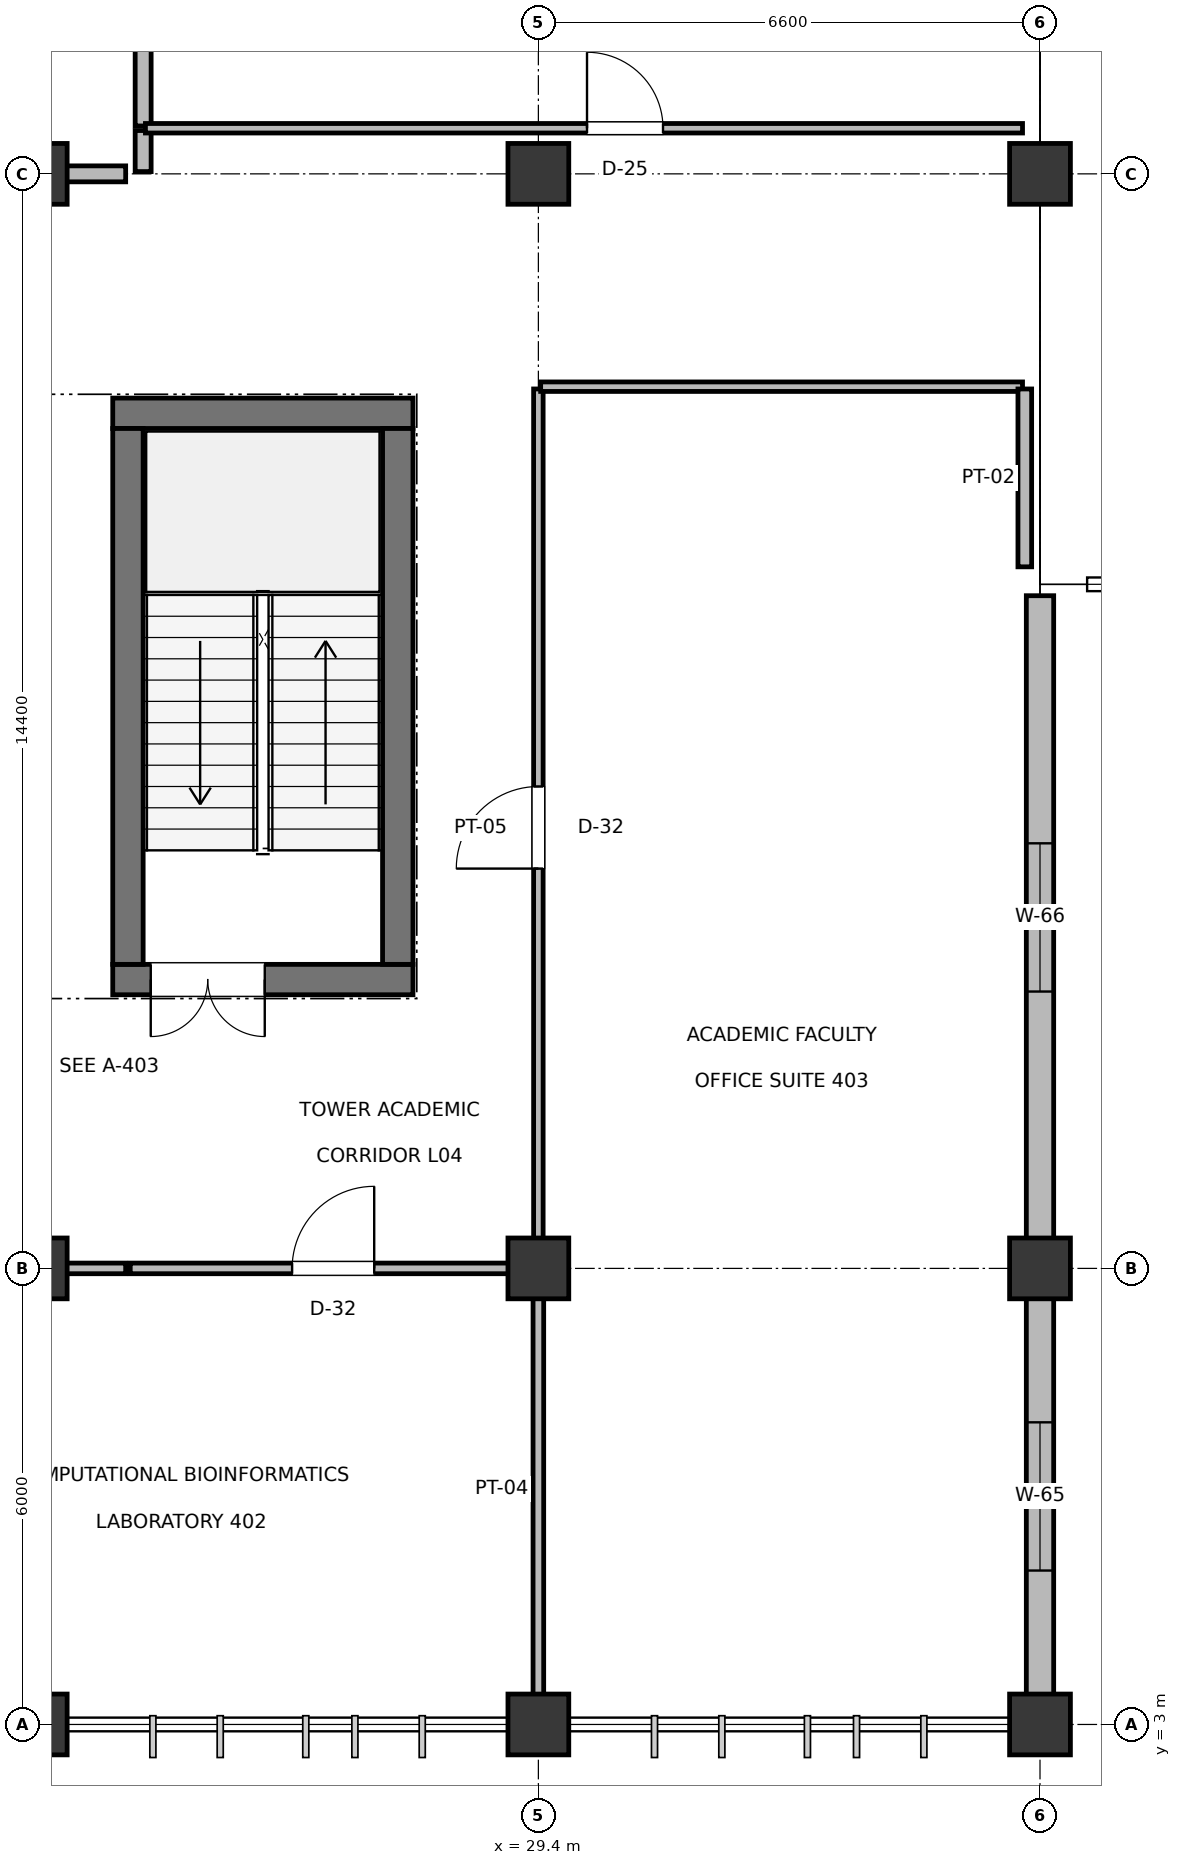
"""IFC4 building model, lengths in metres.
Left out: names, types, materials, properties, quantities, classifications, styles, units other than length and angle.
Written with IfcOpenShell. Run it as: python <this file> out.ifc"""

import sys

from ifc_helpers import new_model, si_unit, direction, frame, frame_2d, origin, origin_2d, place, context, subcontext, project, spatial, rectangle, extrude, element, fill, save


model = new_model("IFC4")
c1 = context("Model", 3, precision=1e-05, world=origin(), true_north=direction((0.0, 1.0)))
c2 = subcontext(c1, "Body", "Model", "MODEL_VIEW")
j1 = project(units=[si_unit("LENGTHUNIT", "METRE"), si_unit("PLANEANGLEUNIT", "RADIAN")], contexts=[c1])
p1 = place(None, origin())
s1 = spatial("IfcSite", under=j1, at=p1, CompositionType="ELEMENT")
p2 = place(p1, origin())
s2 = spatial("IfcBuilding", under=s1, at=p2, CompositionType="ELEMENT")
p3 = place(p2, frame((0.0, 0.0, 19.5)))
s3 = spatial("IfcBuildingStorey", under=s2, at=p3, CompositionType="ELEMENT", Elevation=19.5)
for number, where, z_axis, x_axis in (
    (1, (22.8, 3.0, 0.0), (0.0, 0.0, 1.0), (1.0, 0.0, 0.0)),
    (2, (22.8, 9.0, 0.0), (0.0, 0.0, 1.0), (1.0, 0.0, 0.0)),
    (3, (22.8, 23.4, 0.0), (0.0, 0.0, 1.0), (1.0, 0.0, 0.0)),
    (4, (29.4, 3.0, 0.0), (0.0, 0.0, 1.0), (1.0, 0.0, 0.0)),
    (5, (29.4, 9.0, 0.0), (0.0, 0.0, 1.0), (1.0, 0.0, 0.0)),
    (6, (29.4, 23.4, 0.0), (0.0, 0.0, 1.0), (1.0, 0.0, 0.0)),
    (7, (36.0, 3.0, 0.0), (0.0, 0.0, 1.0), (1.0, 0.0, 0.0)),
    (8, (36.0, 9.0, 0.0), (0.0, 0.0, 1.0), (1.0, 0.0, 0.0)),
    (9, (36.0, 23.4, 0.0), (0.0, 0.0, 1.0), (1.0, 0.0, 0.0)),
):
    element("IfcColumn", number, at=place(p3, frame(where, z_axis=z_axis, x_axis=x_axis)), inside=s3, PredefinedType="COLUMN", context=c2, shape_type="SweptSolid", body=[
        extrude(rectangle(XDim=0.8, YDim=0.8, at=origin_2d()), origin(), (0.0, 0.0, 1.0), 4.5),
    ])
p4 = place(p3, frame((36.0, 3.385, 0.0), z_axis=(0.0, 0.0, 1.0), x_axis=(0.0, 1.0, 0.0)))
e10 = element("IfcWall", 10, at=p4, inside=s3, PredefinedType="SOLIDWALL", context=c2, shape_type="SweptSolid", body=[
    extrude(rectangle(XDim=5.23, YDim=0.36, at=frame_2d((2.615, 0.0))), origin(), (0.0, 0.0, 1.0), 3.625),
])
p5 = place(p4, frame((1.64, 0.0, 0.9)))
e11 = element("IfcOpeningElement", 11, at=p5, cuts=e10, PredefinedType="OPENING", context=c2, shape_type="SweptSolid", body=[
    extrude(rectangle(XDim=1.95, YDim=1.15, at=frame_2d((0.975, 0.575))), frame((0.0, 0.19, 0.0), z_axis=(0.0, -1.0, 0.0), x_axis=(1.0, 0.0, 0.0)), (0.0, 0.0, 1.0), 0.38),
])
p6 = place(p3, frame((36.0, 9.385, 0.0), z_axis=(0.0, 0.0, 1.0), x_axis=(0.0, 1.0, 0.0)))
e12 = element("IfcWall", 12, at=p6, inside=s3, PredefinedType="SOLIDWALL", context=c2, shape_type="SweptSolid", body=[
    extrude(rectangle(XDim=8.465, YDim=0.36, at=frame_2d((4.232, 0.0))), origin(), (0.0, 0.0, 1.0), 3.425),
])
p7 = place(p6, frame((3.258, 0.0, 0.9)))
e13 = element("IfcOpeningElement", 13, at=p7, cuts=e12, PredefinedType="OPENING", context=c2, shape_type="SweptSolid", body=[
    extrude(rectangle(XDim=1.95, YDim=1.35, at=frame_2d((0.975, 0.675))), frame((0.0, 0.19, 0.0), z_axis=(0.0, -1.0, 0.0), x_axis=(1.0, 0.0, 0.0)), (0.0, 0.0, 1.0), 0.38),
])
p8 = place(p3, frame((23.8, 12.8, 0.0), z_axis=(0.0, 0.0, 1.0), x_axis=(1.0, 0.0, 0.0)))
e14 = element("IfcWall", 14, at=p8, inside=s3, PredefinedType="SHEAR", context=c2, shape_type="SweptSolid", body=[
    extrude(rectangle(XDim=3.95, YDim=0.4, at=frame_2d((1.975, 0.0))), origin(), (0.0, 0.0, 1.0), 4.28),
])
p9 = place(p8, frame((0.5, 0.0, 0.0)))
e15 = element("IfcOpeningElement", 15, at=p9, cuts=e14, PredefinedType="OPENING", context=c2, shape_type="SweptSolid", body=[
    extrude(rectangle(XDim=1.5, YDim=2.2, at=frame_2d((0.75, 1.1))), frame((0.0, 0.21, 0.0), z_axis=(0.0, -1.0, 0.0), x_axis=(1.0, 0.0, 0.0)), (0.0, 0.0, 1.0), 0.42),
])
p10 = place(p3, frame((23.8, 20.25, 0.0), z_axis=(0.0, 0.0, 1.0), x_axis=(1.0, 0.0, 0.0)))
e16 = element("IfcWall", 16, at=p10, inside=s3, PredefinedType="SHEAR", context=c2, shape_type="SweptSolid", body=[
    extrude(rectangle(XDim=3.95, YDim=0.4, at=frame_2d((1.975, 0.0))), origin(), (0.0, 0.0, 1.0), 4.28),
])
for number, where, z_axis, x_axis in (
    (17, (24.0, 13.0, 0.0), (0.0, 0.0, 1.0), (0.0, 1.0, 0.0)),
    (18, (27.55, 13.0, 0.0), (0.0, 0.0, 1.0), (0.0, 1.0, 0.0)),
):
    element("IfcWall", number, at=place(p3, frame(where, z_axis=z_axis, x_axis=x_axis)), inside=s3, PredefinedType="SHEAR", context=c2, shape_type="SweptSolid", body=[
        extrude(rectangle(XDim=7.05, YDim=0.4, at=frame_2d((3.525, 0.0))), origin(), (0.0, 0.0, 1.0), 4.28),
    ])
p11 = place(p3, frame((29.4, 3.23, 0.0), z_axis=(0.0, 0.0, 1.0), x_axis=(0.0, 1.0, 0.0)))
e19 = element("IfcWall", 19, at=p11, inside=s3, PredefinedType="PARTITIONING", context=c2, shape_type="SweptSolid", body=[
    extrude(rectangle(XDim=5.74, YDim=0.14, at=frame_2d((2.87, 0.0))), origin(), (0.0, 0.0, 1.0), 3.625),
])
p12 = place(p3, frame((24.03, 9.0, 0.0), z_axis=(0.0, 0.0, 1.0), x_axis=(1.0, 0.0, 0.0)))
e20 = element("IfcWall", 20, at=p12, inside=s3, PredefinedType="PARTITIONING", context=c2, shape_type="SweptSolid", body=[
    extrude(rectangle(XDim=5.34, YDim=0.14, at=frame_2d((2.67, 0.0))), origin(), (0.0, 0.0, 1.0), 3.355),
])
p13 = place(p12, frame((2.13, 0.0, 0.0)))
e21 = element("IfcOpeningElement", 21, at=p13, cuts=e20, PredefinedType="OPENING", context=c2, shape_type="SweptSolid", body=[
    extrude(rectangle(XDim=1.08, YDim=2.15, at=frame_2d((0.54, 1.075))), frame((0.0, 0.08, 0.0), z_axis=(0.0, -1.0, 0.0), x_axis=(1.0, 0.0, 0.0)), (0.0, 0.0, 1.0), 0.16),
])
p14 = place(p3, frame((20.03, 9.0, 0.0), z_axis=(0.0, 0.0, 1.0), x_axis=(1.0, 0.0, 0.0)))
e22 = element("IfcWall", 22, at=p14, inside=s3, PredefinedType="PARTITIONING", context=c2, shape_type="SweptSolid", body=[
    extrude(rectangle(XDim=3.94, YDim=0.14, at=frame_2d((1.97, 0.0))), origin(), (0.0, 0.0, 1.0), 3.355),
])
p15 = place(p3, frame((29.4, 9.03, 0.0), z_axis=(0.0, 0.0, 1.0), x_axis=(0.0, 1.0, 0.0)))
e23 = element("IfcWall", 23, at=p15, inside=s3, PredefinedType="PARTITIONING", context=c2, shape_type="SweptSolid", body=[
    extrude(rectangle(XDim=11.54, YDim=0.125, at=frame_2d((5.77, 0.0))), origin(), (0.0, 0.0, 1.0), 3.425),
])
p16 = place(p15, frame((5.23, 0.0, 0.0)))
e24 = element("IfcOpeningElement", 24, at=p16, cuts=e23, PredefinedType="OPENING", context=c2, shape_type="SweptSolid", body=[
    extrude(rectangle(XDim=1.08, YDim=2.15, at=frame_2d((0.54, 1.075))), frame((0.0, 0.073, 0.0), z_axis=(0.0, -1.0, 0.0), x_axis=(1.0, 0.0, 0.0)), (0.0, 0.0, 1.0), 0.145),
])
p17 = place(p3, frame((29.43, 20.6, 0.0), z_axis=(0.0, 0.0, 1.0), x_axis=(1.0, 0.0, 0.0)))
e25 = element("IfcWall", 25, at=p17, inside=s3, PredefinedType="PARTITIONING", context=c2, shape_type="SweptSolid", body=[
    extrude(rectangle(XDim=6.34, YDim=0.125, at=frame_2d((3.17, 0.0))), origin(), (0.0, 0.0, 1.0), 3.425),
])
p18 = place(p3, frame((35.8, 18.23, 0.0), z_axis=(0.0, 0.0, 1.0), x_axis=(0.0, 1.0, 0.0)))
e26 = element("IfcWall", 26, at=p18, inside=s3, PredefinedType="PARTITIONING", context=c2, shape_type="SweptSolid", body=[
    extrude(rectangle(XDim=2.34, YDim=0.18, at=frame_2d((1.17, 0.0))), origin(), (0.0, 0.0, 1.0), 3.425),
])
p19 = place(p3, frame((24.2, 24.03, 0.0), z_axis=(0.0, 0.0, 1.0), x_axis=(0.0, 1.0, 0.0)))
e27 = element("IfcWall", 27, at=p19, inside=s3, PredefinedType="PLUMBINGWALL", context=c2, shape_type="SweptSolid", body=[
    extrude(rectangle(XDim=5.74, YDim=0.21, at=frame_2d((2.87, 0.0))), origin(), (0.0, 0.0, 1.0), 3.525),
])
p20 = place(p3, frame((24.2, 23.43, 0.0), z_axis=(0.0, 0.0, 1.0), x_axis=(0.0, 1.0, 0.0)))
e28 = element("IfcWall", 28, at=p20, inside=s3, PredefinedType="PLUMBINGWALL", context=c2, shape_type="SweptSolid", body=[
    extrude(rectangle(XDim=0.54, YDim=0.21, at=frame_2d((0.27, 0.0))), origin(), (0.0, 0.0, 1.0), 3.525),
])
p21 = place(p3, frame((17.83, 23.4, 0.0), z_axis=(0.0, 0.0, 1.0), x_axis=(1.0, 0.0, 0.0)))
e29 = element("IfcWall", 29, at=p21, inside=s3, PredefinedType="PLUMBINGWALL", context=c2, shape_type="SweptSolid", body=[
    extrude(rectangle(XDim=6.14, YDim=0.21, at=frame_2d((3.07, 0.0))), origin(), (0.0, 0.0, 1.0), 3.295),
])
p22 = place(p3, frame((24.23, 24.0, 0.0), z_axis=(0.0, 0.0, 1.0), x_axis=(1.0, 0.0, 0.0)))
e30 = element("IfcWall", 30, at=p22, inside=s3, PredefinedType="PARTITIONING", context=c2, shape_type="SweptSolid", body=[
    extrude(rectangle(XDim=11.54, YDim=0.125, at=frame_2d((5.77, 0.0))), origin(), (0.0, 0.0, 1.0), 3.595),
])
p23 = place(p22, frame((5.81, 0.0, 0.0)))
e31 = element("IfcOpeningElement", 31, at=p23, cuts=e30, PredefinedType="OPENING", context=c2, shape_type="SweptSolid", body=[
    extrude(rectangle(XDim=1.0, YDim=2.15, at=frame_2d((0.5, 1.075))), frame((0.0, 0.073, 0.0), z_axis=(0.0, -1.0, 0.0), x_axis=(1.0, 0.0, 0.0)), (0.0, 0.0, 1.0), 0.145),
])
p24 = place(p5, frame((1.95, 0.0, 0.0), z_axis=(0.0, 0.0, 1.0), x_axis=(-1.0, 0.0, 0.0)))
e32 = element("IfcWindow", 32, at=p24, inside=s3, PartitioningType="DOUBLE_PANEL_VERTICAL", PredefinedType="WINDOW", context=c2, shape_type="SweptSolid", body=[
    extrude(rectangle(XDim=1.95, YDim=1.15, at=frame_2d((0.975, 0.575))), frame((0.0, 0.03, 0.0), z_axis=(0.0, -1.0, 0.0), x_axis=(1.0, 0.0, 0.0)), (0.0, 0.0, 1.0), 0.06),
])
fill(e11, e32)
p25 = place(p7, frame((1.95, 0.0, 0.0), z_axis=(0.0, 0.0, 1.0), x_axis=(-1.0, 0.0, 0.0)))
e33 = element("IfcWindow", 33, at=p25, inside=s3, PartitioningType="DOUBLE_PANEL_VERTICAL", PredefinedType="WINDOW", context=c2, shape_type="SweptSolid", body=[
    extrude(rectangle(XDim=1.95, YDim=1.35, at=frame_2d((0.975, 0.675))), frame((0.0, 0.03, 0.0), z_axis=(0.0, -1.0, 0.0), x_axis=(1.0, 0.0, 0.0)), (0.0, 0.0, 1.0), 0.06),
])
fill(e13, e33)
p26 = place(p9, frame((1.5, 0.0, 0.0), z_axis=(0.0, 0.0, 1.0), x_axis=(-1.0, 0.0, 0.0)))
e34 = element("IfcDoor", 34, at=p26, inside=s3, OperationType="DOUBLE_DOOR_SINGLE_SWING", PredefinedType="DOOR", context=c2, shape_type="SweptSolid", body=[
    extrude(rectangle(XDim=1.5, YDim=2.2, at=frame_2d((0.75, 1.1))), frame((0.0, 0.025, 0.0), z_axis=(0.0, -1.0, 0.0), x_axis=(1.0, 0.0, 0.0)), (0.0, 0.0, 1.0), 0.05),
])
fill(e15, e34)
p27 = place(p13, origin())
e35 = element("IfcDoor", 35, at=p27, inside=s3, OperationType="SINGLE_SWING_RIGHT", PredefinedType="DOOR", context=c2, shape_type="SweptSolid", body=[
    extrude(rectangle(XDim=1.08, YDim=2.15, at=frame_2d((0.54, 1.075))), frame((0.0, 0.025, 0.0), z_axis=(0.0, -1.0, 0.0), x_axis=(1.0, 0.0, 0.0)), (0.0, 0.0, 1.0), 0.05),
])
fill(e21, e35)
p28 = place(p16, origin())
e36 = element("IfcDoor", 36, at=p28, inside=s3, OperationType="SINGLE_SWING_LEFT", PredefinedType="DOOR", context=c2, shape_type="SweptSolid", body=[
    extrude(rectangle(XDim=1.08, YDim=2.15, at=frame_2d((0.54, 1.075))), frame((0.0, 0.025, 0.0), z_axis=(0.0, -1.0, 0.0), x_axis=(1.0, 0.0, 0.0)), (0.0, 0.0, 1.0), 0.05),
])
fill(e24, e36)
p29 = place(p23, origin())
e37 = element("IfcDoor", 37, at=p29, inside=s3, OperationType="SINGLE_SWING_LEFT", PredefinedType="DOOR", context=c2, shape_type="SweptSolid", body=[
    extrude(rectangle(XDim=1.0, YDim=2.15, at=frame_2d((0.5, 1.075))), frame((0.0, 0.025, 0.0), z_axis=(0.0, -1.0, 0.0), x_axis=(1.0, 0.0, 0.0)), (0.0, 0.0, 1.0), 0.05),
])
fill(e31, e37)
save(model, sys.argv[1])
